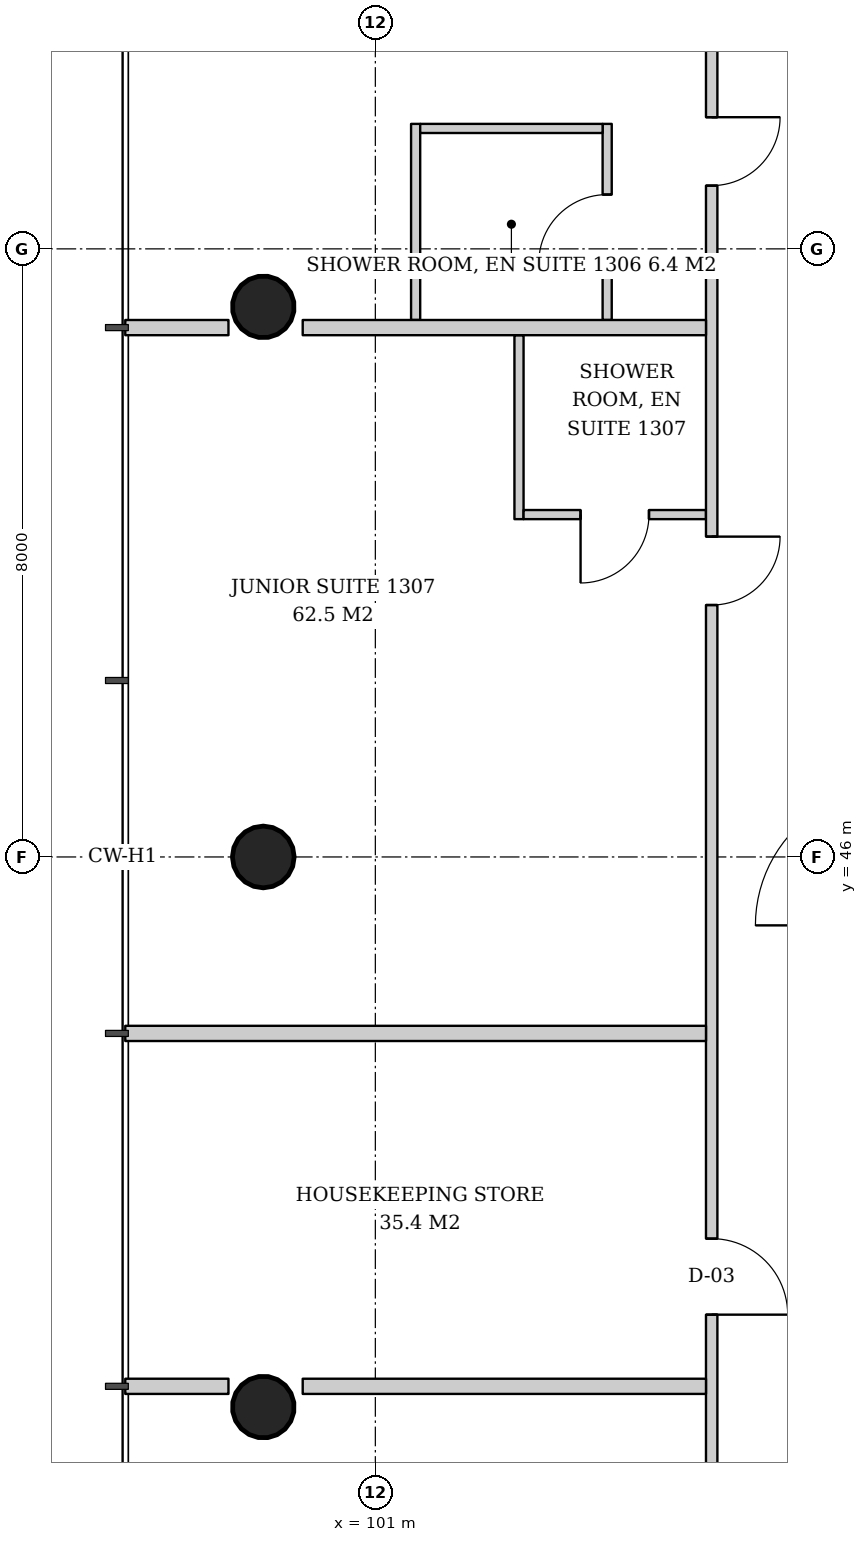
"""IFC4 building model, lengths in metres.
Left out: names, types, materials, properties, quantities, classifications, styles, units other than length and angle.
Written with IfcOpenShell. Run it as: python <this file> out.ifc"""

import sys

from ifc_helpers import new_model, si_unit, direction, frame, frame_2d, origin, origin_2d, place, context, subcontext, project, spatial, rectangle, hollow_circle, extrude, element, fill, save


model = new_model("IFC4")
c1 = context("Model", 3, precision=1e-05, world=origin(), true_north=direction((0.0, 1.0)))
c2 = subcontext(c1, "Body", "Model", "MODEL_VIEW")
j1 = project(units=[si_unit("LENGTHUNIT", "METRE"), si_unit("PLANEANGLEUNIT", "RADIAN")], contexts=[c1])
p1 = place(None, origin())
s1 = spatial("IfcSite", under=j1, at=p1, CompositionType="ELEMENT")
p2 = place(p1, origin())
s2 = spatial("IfcBuilding", under=s1, at=p2, CompositionType="ELEMENT")
p3 = place(p2, frame((0.0, 0.0, 55.2)))
s3 = spatial("IfcBuildingStorey", under=s2, at=p3, CompositionType="ELEMENT", Elevation=55.2)
p4 = place(p3, frame((99.474, 53.263, 0.0), z_axis=(0.043059584825, -0.021497706284, 0.998841188968), x_axis=(0.446680166538, 0.894693706707, 0.0)))
e1 = element("IfcColumn", 1, at=p4, inside=s3, PredefinedType="COLUMN", context=c2, shape_type="SweptSolid", body=[
    extrude(hollow_circle(Radius=0.406, WallThickness=0.03, at=origin_2d()), origin(), (0.0, 0.0, 1.0), 3.804),
])
p5 = place(p3, frame((99.474, 46.0, 0.0), z_axis=(0.043069538298, 0.0, 0.999072076915), x_axis=(0.0, 1.0, 0.0)))
e2 = element("IfcColumn", 2, at=p5, inside=s3, PredefinedType="COLUMN", context=c2, shape_type="SweptSolid", body=[
    extrude(hollow_circle(Radius=0.406, WallThickness=0.03, at=origin_2d()), origin(), (0.0, 0.0, 1.0), 3.803),
])
p6 = place(p3, frame((99.474, 38.737, 0.0), z_axis=(0.043059584825, 0.021497706284, 0.998841188968), x_axis=(-0.446680166538, 0.894693706707, 0.0)))
e3 = element("IfcColumn", 3, at=p6, inside=s3, PredefinedType="COLUMN", context=c2, shape_type="SweptSolid", body=[
    extrude(hollow_circle(Radius=0.406, WallThickness=0.03, at=origin_2d()), origin(), (0.0, 0.0, 1.0), 3.804),
])
p7 = place(p3, frame((104.05, 53.064, 0.0), z_axis=(0.0, 0.0, 1.0), x_axis=(0.0, 1.0, 0.0)))
e4 = element("IfcWall", 4, at=p7, inside=s3, PredefinedType="PARTITIONING", context=c2, shape_type="SweptSolid", body=[
    extrude(rectangle(XDim=2.58, YDim=0.12, at=frame_2d((1.29, 0.0))), origin(), (0.0, 0.0, 1.0), 2.8),
])
p8 = place(p7, frame((0.75, 0.0, 0.0)))
e5 = element("IfcOpeningElement", 5, at=p8, cuts=e4, PredefinedType="OPENING", context=c2, shape_type="SweptSolid", body=[
    extrude(rectangle(XDim=0.9, YDim=2.1, at=frame_2d((0.45, 1.05))), frame((0.0, 0.07, 0.0), z_axis=(0.0, -1.0, 0.0), x_axis=(1.0, 0.0, 0.0)), (0.0, 0.0, 1.0), 0.14),
])
p9 = place(p3, frame((101.53, 53.064, 0.0), z_axis=(0.0, 0.0, 1.0), x_axis=(0.0, 1.0, 0.0)))
e6 = element("IfcWall", 6, at=p9, inside=s3, PredefinedType="PARTITIONING", context=c2, shape_type="SweptSolid", body=[
    extrude(rectangle(XDim=2.58, YDim=0.12, at=frame_2d((1.29, 0.0))), origin(), (0.0, 0.0, 1.0), 2.8),
])
p10 = place(p3, frame((103.99, 55.584, 0.0), z_axis=(0.0, 0.0, 1.0), x_axis=(-1.0, 0.0, 0.0)))
e7 = element("IfcWall", 7, at=p10, inside=s3, PredefinedType="PARTITIONING", context=c2, shape_type="SweptSolid", body=[
    extrude(rectangle(XDim=2.4, YDim=0.12, at=frame_2d((1.2, 0.0))), origin(), (0.0, 0.0, 1.0), 2.847),
])
p11 = place(p3, frame((102.89, 52.864, 0.0), z_axis=(0.0, 0.0, 1.0), x_axis=(0.0, -1.0, 0.0)))
e8 = element("IfcWall", 8, at=p11, inside=s3, PredefinedType="PARTITIONING", context=c2, shape_type="SweptSolid", body=[
    extrude(rectangle(XDim=2.42, YDim=0.12, at=frame_2d((1.21, 0.0))), origin(), (0.0, 0.0, 1.0), 2.847),
])
p12 = place(p3, frame((105.35, 50.504, 0.0), z_axis=(0.0, 0.0, 1.0), x_axis=(-1.0, 0.0, 0.0)))
e9 = element("IfcWall", 9, at=p12, inside=s3, PredefinedType="PARTITIONING", context=c2, shape_type="SweptSolid", body=[
    extrude(rectangle(XDim=2.4, YDim=0.12, at=frame_2d((1.2, 0.0))), origin(), (0.0, 0.0, 1.0), 3.6),
])
p13 = place(p12, frame((0.75, 0.0, 0.0)))
e10 = element("IfcOpeningElement", 10, at=p13, cuts=e9, PredefinedType="OPENING", context=c2, shape_type="SweptSolid", body=[
    extrude(rectangle(XDim=0.9, YDim=2.1, at=frame_2d((0.45, 1.05))), frame((0.0, 0.07, 0.0), z_axis=(0.0, -1.0, 0.0), x_axis=(1.0, 0.0, 0.0)), (0.0, 0.0, 1.0), 0.14),
])
p14 = place(p3, frame((105.425, 57.65, 0.0), z_axis=(0.0, 0.0, 1.0), x_axis=(0.0, -1.0, 0.0)))
e11 = element("IfcWall", 11, at=p14, inside=s3, PredefinedType="PARTITIONING", context=c2, shape_type="SweptSolid", body=[
    extrude(rectangle(XDim=23.15, YDim=0.15, at=frame_2d((11.575, 0.0))), origin(), (0.0, 0.0, 1.0), 2.8),
])
p15 = place(p14, frame((1.918, 0.0, 0.0)))
e12 = element("IfcOpeningElement", 12, at=p15, cuts=e11, PredefinedType="OPENING", context=c2, shape_type="SweptSolid", body=[
    extrude(rectangle(XDim=0.9, YDim=2.1, at=frame_2d((0.45, 1.05))), frame((0.0, 0.085, 0.0), z_axis=(0.0, -1.0, 0.0), x_axis=(1.0, 0.0, 0.0)), (0.0, 0.0, 1.0), 0.17),
])
p16 = place(p14, frame((7.436, 0.0, 0.0)))
e13 = element("IfcOpeningElement", 13, at=p16, cuts=e11, PredefinedType="OPENING", context=c2, shape_type="SweptSolid", body=[
    extrude(rectangle(XDim=0.9, YDim=2.1, at=frame_2d((0.45, 1.05))), frame((0.0, 0.085, 0.0), z_axis=(0.0, -1.0, 0.0), x_axis=(1.0, 0.0, 0.0)), (0.0, 0.0, 1.0), 0.17),
])
p17 = place(p14, frame((16.671, 0.0, 0.0)))
e14 = element("IfcOpeningElement", 14, at=p17, cuts=e11, PredefinedType="OPENING", context=c2, shape_type="SweptSolid", body=[
    extrude(rectangle(XDim=1.0, YDim=2.1, at=frame_2d((0.5, 1.05))), frame((0.0, 0.085, 0.0), z_axis=(0.0, -1.0, 0.0), x_axis=(1.0, 0.0, 0.0)), (0.0, 0.0, 1.0), 0.17),
])
p18 = place(p3, frame((105.35, 52.964, 0.0), z_axis=(0.0, 0.0, 1.0), x_axis=(-1.0, 0.0, 0.0)))
e15 = element("IfcWall", 15, at=p18, inside=s3, PredefinedType="PARTITIONING", context=c2, shape_type="SweptSolid", body=[
    extrude(rectangle(XDim=5.306, YDim=0.2, at=frame_2d((2.653, 0.0))), origin(), (0.0, 0.0, 1.0), 3.6),
])
p19 = place(p3, frame((99.068, 52.964, 0.0), z_axis=(0.0, 0.0, 1.0), x_axis=(-1.0, 0.0, 0.0)))
e16 = element("IfcWall", 16, at=p19, inside=s3, PredefinedType="PARTITIONING", context=c2, shape_type="SweptSolid", body=[
    extrude(rectangle(XDim=1.358, YDim=0.2, at=frame_2d((0.679, 0.0))), origin(), (0.0, 0.0, 1.0), 3.6),
])
p20 = place(p3, frame((105.35, 43.678, 0.0), z_axis=(0.0, 0.0, 1.0), x_axis=(-1.0, 0.0, 0.0)))
e17 = element("IfcWall", 17, at=p20, inside=s3, PredefinedType="PARTITIONING", context=c2, shape_type="SweptSolid", body=[
    extrude(rectangle(XDim=7.64, YDim=0.2, at=frame_2d((3.82, 0.0))), origin(), (0.0, 0.0, 1.0), 3.05),
])
p21 = place(p3, frame((105.35, 39.036, 0.0), z_axis=(0.0, 0.0, 1.0), x_axis=(-1.0, 0.0, 0.0)))
e18 = element("IfcWall", 18, at=p21, inside=s3, PredefinedType="PARTITIONING", context=c2, shape_type="SweptSolid", body=[
    extrude(rectangle(XDim=5.306, YDim=0.2, at=frame_2d((2.653, 0.0))), origin(), (0.0, 0.0, 1.0), 3.6),
])
p22 = place(p3, frame((99.068, 39.036, 0.0), z_axis=(0.0, 0.0, 1.0), x_axis=(-1.0, 0.0, 0.0)))
e19 = element("IfcWall", 19, at=p22, inside=s3, PredefinedType="PARTITIONING", context=c2, shape_type="SweptSolid", body=[
    extrude(rectangle(XDim=1.358, YDim=0.2, at=frame_2d((0.679, 0.0))), origin(), (0.0, 0.0, 1.0), 3.6),
])
p23 = place(p8, origin())
e20 = element("IfcDoor", 20, at=p23, inside=s3, OperationType="SINGLE_SWING_LEFT", PredefinedType="DOOR", context=c2, shape_type="SweptSolid", body=[
    extrude(rectangle(XDim=0.9, YDim=2.1, at=frame_2d((0.45, 1.05))), frame((0.0, 0.025, 0.0), z_axis=(0.0, -1.0, 0.0), x_axis=(1.0, 0.0, 0.0)), (0.0, 0.0, 1.0), 0.05),
])
fill(e5, e20)
p24 = place(p13, origin())
e21 = element("IfcDoor", 21, at=p24, inside=s3, OperationType="SINGLE_SWING_RIGHT", PredefinedType="DOOR", context=c2, shape_type="SweptSolid", body=[
    extrude(rectangle(XDim=0.9, YDim=2.1, at=frame_2d((0.45, 1.05))), frame((0.0, 0.025, 0.0), z_axis=(0.0, -1.0, 0.0), x_axis=(1.0, 0.0, 0.0)), (0.0, 0.0, 1.0), 0.05),
])
fill(e10, e21)
p25 = place(p15, origin())
e22 = element("IfcDoor", 22, at=p25, inside=s3, OperationType="SINGLE_SWING_LEFT", PredefinedType="DOOR", context=c2, shape_type="SweptSolid", body=[
    extrude(rectangle(XDim=0.9, YDim=2.1, at=frame_2d((0.45, 1.05))), frame((0.0, 0.025, 0.0), z_axis=(0.0, -1.0, 0.0), x_axis=(1.0, 0.0, 0.0)), (0.0, 0.0, 1.0), 0.05),
])
fill(e12, e22)
p26 = place(p16, origin())
e23 = element("IfcDoor", 23, at=p26, inside=s3, OperationType="SINGLE_SWING_LEFT", PredefinedType="DOOR", context=c2, shape_type="SweptSolid", body=[
    extrude(rectangle(XDim=0.9, YDim=2.1, at=frame_2d((0.45, 1.05))), frame((0.0, 0.025, 0.0), z_axis=(0.0, -1.0, 0.0), x_axis=(1.0, 0.0, 0.0)), (0.0, 0.0, 1.0), 0.05),
])
fill(e13, e23)
p27 = place(p17, origin())
e24 = element("IfcDoor", 24, at=p27, inside=s3, OperationType="SINGLE_SWING_RIGHT", PredefinedType="DOOR", context=c2, shape_type="SweptSolid", body=[
    extrude(rectangle(XDim=1.0, YDim=2.1, at=frame_2d((0.5, 1.05))), frame((0.0, 0.025, 0.0), z_axis=(0.0, -1.0, 0.0), x_axis=(1.0, 0.0, 0.0)), (0.0, 0.0, 1.0), 0.05),
])
fill(e14, e24)
save(model, sys.argv[1])
